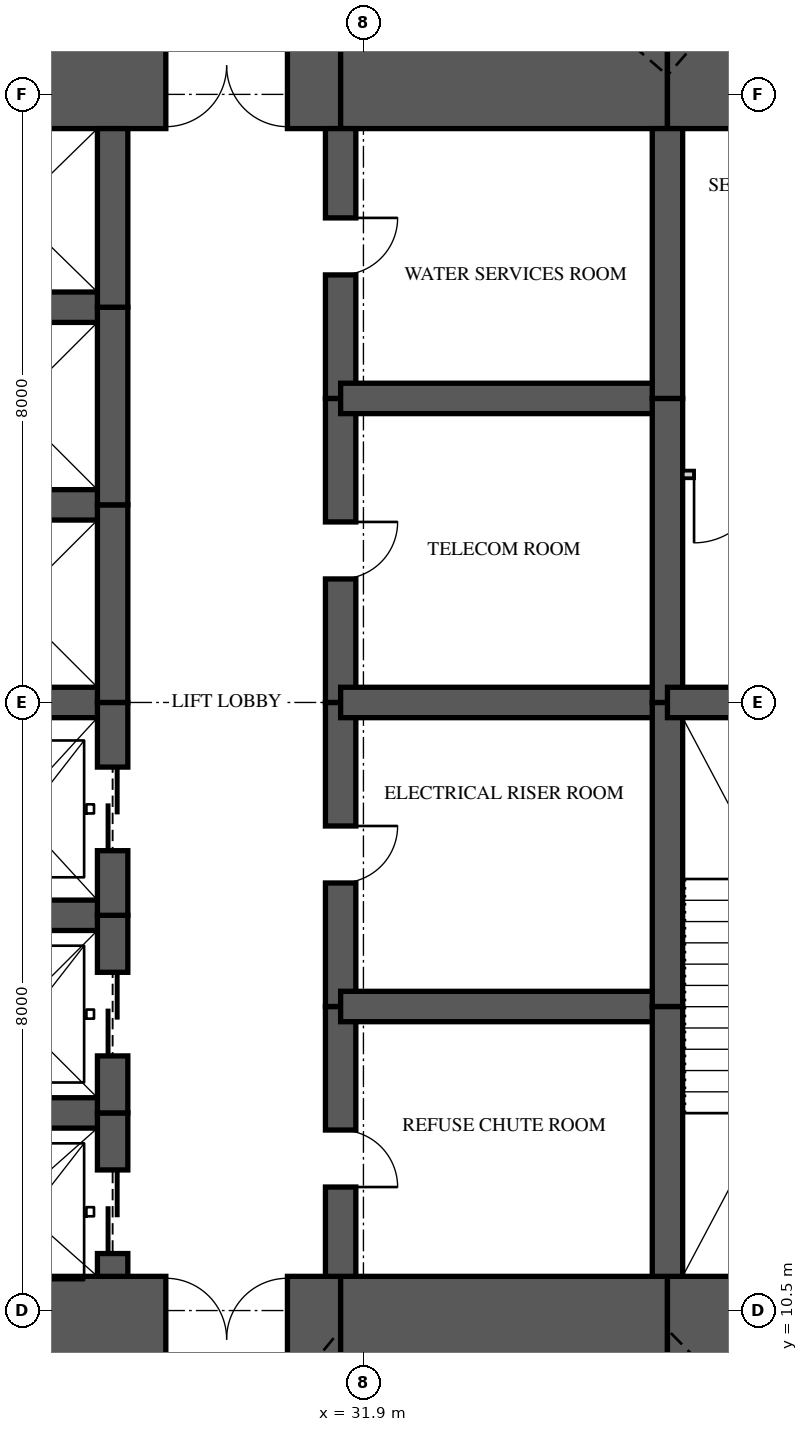
"""IFC4 building model, lengths in metres.
Left out: names, types, materials, properties, quantities, classifications, styles, units other than length and angle.
Written with IfcOpenShell. Run it as: python <this file> out.ifc"""

import sys

from ifc_helpers import new_model, si_unit, direction, frame, frame_2d, origin, place, context, subcontext, project, spatial, rectangle, extrude, element, fill, save


model = new_model("IFC4")
c1 = context("Model", 3, precision=1e-05, world=origin(), true_north=direction((0.0, 1.0)))
c2 = subcontext(c1, "Body", "Model", "MODEL_VIEW")
j1 = project(units=[si_unit("LENGTHUNIT", "METRE"), si_unit("PLANEANGLEUNIT", "RADIAN")], contexts=[c1])
p1 = place(None, origin())
s1 = spatial("IfcSite", under=j1, at=p1, CompositionType="ELEMENT")
p2 = place(p1, origin())
s2 = spatial("IfcBuilding", under=s1, at=p2, CompositionType="ELEMENT")
p3 = place(p2, frame((0.0, 0.0, 71.25)))
s3 = spatial("IfcBuildingStorey", under=s2, at=p3, CompositionType="ELEMENT", Elevation=71.25)
p4 = place(p3, frame((26.0, 10.125, 0.0), z_axis=(0.0, 0.0, 1.0), x_axis=(1.0, 0.0, 0.0)))
e1 = element("IfcWall", 1, at=p4, inside=s3, PredefinedType="SHEAR", context=c2, shape_type="SweptSolid", body=[
    extrude(rectangle(XDim=5.6, YDim=1.65, at=frame_2d((2.8, 0.0))), origin(), (0.0, 0.0, 1.0), 3.5),
])
p5 = place(p4, frame((3.3, 0.0, 0.0)))
e2 = element("IfcOpeningElement", 2, at=p5, cuts=e1, PredefinedType="OPENING", context=c2, shape_type="SweptSolid", body=[
    extrude(rectangle(XDim=1.6, YDim=2.1, at=frame_2d((0.8, 1.05))), frame((0.0, 0.835, 0.0), z_axis=(0.0, -1.0, 0.0), x_axis=(1.0, 0.0, 0.0)), (0.0, 0.0, 1.0), 1.67),
])
p6 = place(p3, frame((31.6, 10.125, 0.0), z_axis=(0.0, 0.0, 1.0), x_axis=(1.0, 0.0, 0.0)))
e3 = element("IfcWall", 3, at=p6, inside=s3, PredefinedType="SHEAR", context=c2, shape_type="SweptSolid", body=[
    extrude(rectangle(XDim=4.3, YDim=1.65, at=frame_2d((2.15, 0.0))), origin(), (0.0, 0.0, 1.0), 3.5),
])
p7 = place(p3, frame((35.9, 10.125, 0.0), z_axis=(0.0, 0.0, 1.0), x_axis=(1.0, 0.0, 0.0)))
e4 = element("IfcWall", 4, at=p7, inside=s3, PredefinedType="SHEAR", context=c2, shape_type="SweptSolid", body=[
    extrude(rectangle(XDim=8.375, YDim=1.65, at=frame_2d((4.188, 0.0))), origin(), (0.0, 0.0, 1.0), 3.5),
])
p8 = place(p7, frame((2.7, 0.0, 0.0)))
e5 = element("IfcOpeningElement", 5, at=p8, cuts=e4, PredefinedType="OPENING", context=c2, shape_type="SweptSolid", body=[
    extrude(rectangle(XDim=1.0, YDim=2.1, at=frame_2d((0.5, 1.05))), frame((0.0, 0.835, 0.0), z_axis=(0.0, -1.0, 0.0), x_axis=(1.0, 0.0, 0.0)), (0.0, 0.0, 1.0), 1.67),
])
p9 = place(p3, frame((44.275, 26.875, 0.0), z_axis=(0.0, 0.0, 1.0), x_axis=(-1.0, 0.0, 0.0)))
e6 = element("IfcWall", 6, at=p9, inside=s3, PredefinedType="SHEAR", context=c2, shape_type="SweptSolid", body=[
    extrude(rectangle(XDim=8.375, YDim=1.65, at=frame_2d((4.188, 0.0))), origin(), (0.0, 0.0, 1.0), 3.5),
])
p10 = place(p9, frame((5.775, 0.0, 0.0)))
e7 = element("IfcOpeningElement", 7, at=p10, cuts=e6, PredefinedType="OPENING", context=c2, shape_type="SweptSolid", body=[
    extrude(rectangle(XDim=0.9, YDim=2.1, at=frame_2d((0.45, 1.05))), frame((0.0, 0.835, 0.0), z_axis=(0.0, -1.0, 0.0), x_axis=(1.0, 0.0, 0.0)), (0.0, 0.0, 1.0), 1.67),
])
p11 = place(p3, frame((35.9, 26.875, 0.0), z_axis=(0.0, 0.0, 1.0), x_axis=(-1.0, 0.0, 0.0)))
e8 = element("IfcWall", 8, at=p11, inside=s3, PredefinedType="SHEAR", context=c2, shape_type="SweptSolid", body=[
    extrude(rectangle(XDim=4.3, YDim=1.65, at=frame_2d((2.15, 0.0))), origin(), (0.0, 0.0, 1.0), 3.5),
])
p12 = place(p3, frame((31.6, 26.875, 0.0), z_axis=(0.0, 0.0, 1.0), x_axis=(-1.0, 0.0, 0.0)))
e9 = element("IfcWall", 9, at=p12, inside=s3, PredefinedType="SHEAR", context=c2, shape_type="SweptSolid", body=[
    extrude(rectangle(XDim=5.6, YDim=1.65, at=frame_2d((2.8, 0.0))), origin(), (0.0, 0.0, 1.0), 3.5),
])
p13 = place(p12, frame((0.7, 0.0, 0.0)))
e10 = element("IfcOpeningElement", 10, at=p13, cuts=e9, PredefinedType="OPENING", context=c2, shape_type="SweptSolid", body=[
    extrude(rectangle(XDim=1.6, YDim=2.1, at=frame_2d((0.8, 1.05))), frame((0.0, 0.835, 0.0), z_axis=(0.0, -1.0, 0.0), x_axis=(1.0, 0.0, 0.0)), (0.0, 0.0, 1.0), 1.67),
])
p14 = place(p3, frame((28.6, 10.95, 0.0), z_axis=(0.0, 0.0, 1.0), x_axis=(0.0, 1.0, 0.0)))
e11 = element("IfcWall", 11, at=p14, inside=s3, PredefinedType="SHEAR", context=c2, shape_type="SweptSolid", body=[
    extrude(rectangle(XDim=2.15, YDim=0.4, at=frame_2d((1.075, 0.0))), origin(), (0.0, 0.0, 1.0), 3.5),
])
p15 = place(p14, frame((0.3, 0.0, 0.0)))
e12 = element("IfcOpeningElement", 12, at=p15, cuts=e11, PredefinedType="OPENING", context=c2, shape_type="SweptSolid", body=[
    extrude(rectangle(XDim=1.1, YDim=2.1, at=frame_2d((0.55, 1.05))), frame((0.0, 0.21, 0.0), z_axis=(0.0, -1.0, 0.0), x_axis=(1.0, 0.0, 0.0)), (0.0, 0.0, 1.0), 0.42),
])
p16 = place(p3, frame((28.6, 13.1, 0.0), z_axis=(0.0, 0.0, 1.0), x_axis=(0.0, 1.0, 0.0)))
e13 = element("IfcWall", 13, at=p16, inside=s3, PredefinedType="SHEAR", context=c2, shape_type="SweptSolid", body=[
    extrude(rectangle(XDim=2.6, YDim=0.4, at=frame_2d((1.3, 0.0))), origin(), (0.0, 0.0, 1.0), 3.5),
])
p17 = place(p16, frame((0.75, 0.0, 0.0)))
e14 = element("IfcOpeningElement", 14, at=p17, cuts=e13, PredefinedType="OPENING", context=c2, shape_type="SweptSolid", body=[
    extrude(rectangle(XDim=1.1, YDim=2.1, at=frame_2d((0.55, 1.05))), frame((0.0, 0.21, 0.0), z_axis=(0.0, -1.0, 0.0), x_axis=(1.0, 0.0, 0.0)), (0.0, 0.0, 1.0), 0.42),
])
p18 = place(p3, frame((28.6, 15.7, 0.0), z_axis=(0.0, 0.0, 1.0), x_axis=(0.0, 1.0, 0.0)))
e15 = element("IfcWall", 15, at=p18, inside=s3, PredefinedType="SHEAR", context=c2, shape_type="SweptSolid", body=[
    extrude(rectangle(XDim=2.8, YDim=0.4, at=frame_2d((1.4, 0.0))), origin(), (0.0, 0.0, 1.0), 3.5),
])
p19 = place(p18, frame((0.85, 0.0, 0.0)))
e16 = element("IfcOpeningElement", 16, at=p19, cuts=e15, PredefinedType="OPENING", context=c2, shape_type="SweptSolid", body=[
    extrude(rectangle(XDim=1.1, YDim=2.1, at=frame_2d((0.55, 1.05))), frame((0.0, 0.21, 0.0), z_axis=(0.0, -1.0, 0.0), x_axis=(1.0, 0.0, 0.0)), (0.0, 0.0, 1.0), 0.42),
])
p20 = place(p3, frame((28.6, 18.5, 0.0), z_axis=(0.0, 0.0, 1.0), x_axis=(0.0, 1.0, 0.0)))
e17 = element("IfcWall", 17, at=p20, inside=s3, PredefinedType="SHEAR", context=c2, shape_type="SweptSolid", body=[
    extrude(rectangle(XDim=2.6, YDim=0.4, at=frame_2d((1.3, 0.0))), origin(), (0.0, 0.0, 1.0), 3.5),
])
p21 = place(p3, frame((28.6, 21.1, 0.0), z_axis=(0.0, 0.0, 1.0), x_axis=(0.0, 1.0, 0.0)))
e18 = element("IfcWall", 18, at=p21, inside=s3, PredefinedType="SHEAR", context=c2, shape_type="SweptSolid", body=[
    extrude(rectangle(XDim=2.6, YDim=0.4, at=frame_2d((1.3, 0.0))), origin(), (0.0, 0.0, 1.0), 3.5),
])
p22 = place(p3, frame((28.6, 23.7, 0.0), z_axis=(0.0, 0.0, 1.0), x_axis=(0.0, 1.0, 0.0)))
e19 = element("IfcWall", 19, at=p22, inside=s3, PredefinedType="SHEAR", context=c2, shape_type="SweptSolid", body=[
    extrude(rectangle(XDim=2.35, YDim=0.4, at=frame_2d((1.175, 0.0))), origin(), (0.0, 0.0, 1.0), 3.5),
])
p23 = place(p3, frame((31.6, 10.95, 0.0), z_axis=(0.0, 0.0, 1.0), x_axis=(0.0, 1.0, 0.0)))
e20 = element("IfcWall", 20, at=p23, inside=s3, PredefinedType="SHEAR", context=c2, shape_type="SweptSolid", body=[
    extrude(rectangle(XDim=3.55, YDim=0.4, at=frame_2d((1.775, 0.0))), origin(), (0.0, 0.0, 1.0), 3.5),
])
p24 = place(p23, frame((1.175, 0.0, 0.0)))
e21 = element("IfcOpeningElement", 21, at=p24, cuts=e20, PredefinedType="OPENING", context=c2, shape_type="SweptSolid", body=[
    extrude(rectangle(XDim=0.75, YDim=2.1, at=frame_2d((0.375, 1.05))), frame((0.0, 0.21, 0.0), z_axis=(0.0, -1.0, 0.0), x_axis=(1.0, 0.0, 0.0)), (0.0, 0.0, 1.0), 0.42),
])
p25 = place(p3, frame((31.6, 14.5, 0.0), z_axis=(0.0, 0.0, 1.0), x_axis=(0.0, 1.0, 0.0)))
e22 = element("IfcWall", 22, at=p25, inside=s3, PredefinedType="SHEAR", context=c2, shape_type="SweptSolid", body=[
    extrude(rectangle(XDim=4.0, YDim=0.4, at=frame_2d((2.0, 0.0))), origin(), (0.0, 0.0, 1.0), 3.5),
])
p26 = place(p25, frame((1.625, 0.0, 0.0)))
e23 = element("IfcOpeningElement", 23, at=p26, cuts=e22, PredefinedType="OPENING", context=c2, shape_type="SweptSolid", body=[
    extrude(rectangle(XDim=0.75, YDim=2.1, at=frame_2d((0.375, 1.05))), frame((0.0, 0.21, 0.0), z_axis=(0.0, -1.0, 0.0), x_axis=(1.0, 0.0, 0.0)), (0.0, 0.0, 1.0), 0.42),
])
p27 = place(p3, frame((31.6, 18.5, 0.0), z_axis=(0.0, 0.0, 1.0), x_axis=(0.0, 1.0, 0.0)))
e24 = element("IfcWall", 24, at=p27, inside=s3, PredefinedType="SHEAR", context=c2, shape_type="SweptSolid", body=[
    extrude(rectangle(XDim=4.0, YDim=0.4, at=frame_2d((2.0, 0.0))), origin(), (0.0, 0.0, 1.0), 3.5),
])
p28 = place(p27, frame((1.625, 0.0, 0.0)))
e25 = element("IfcOpeningElement", 25, at=p28, cuts=e24, PredefinedType="OPENING", context=c2, shape_type="SweptSolid", body=[
    extrude(rectangle(XDim=0.75, YDim=2.1, at=frame_2d((0.375, 1.05))), frame((0.0, 0.21, 0.0), z_axis=(0.0, -1.0, 0.0), x_axis=(1.0, 0.0, 0.0)), (0.0, 0.0, 1.0), 0.42),
])
p29 = place(p3, frame((31.6, 22.5, 0.0), z_axis=(0.0, 0.0, 1.0), x_axis=(0.0, 1.0, 0.0)))
e26 = element("IfcWall", 26, at=p29, inside=s3, PredefinedType="SHEAR", context=c2, shape_type="SweptSolid", body=[
    extrude(rectangle(XDim=3.55, YDim=0.4, at=frame_2d((1.775, 0.0))), origin(), (0.0, 0.0, 1.0), 3.5),
])
p30 = place(p29, frame((1.625, 0.0, 0.0)))
e27 = element("IfcOpeningElement", 27, at=p30, cuts=e26, PredefinedType="OPENING", context=c2, shape_type="SweptSolid", body=[
    extrude(rectangle(XDim=0.75, YDim=2.1, at=frame_2d((0.375, 1.05))), frame((0.0, 0.21, 0.0), z_axis=(0.0, -1.0, 0.0), x_axis=(1.0, 0.0, 0.0)), (0.0, 0.0, 1.0), 0.42),
])
p31 = place(p3, frame((35.9, 10.95, 0.0), z_axis=(0.0, 0.0, 1.0), x_axis=(0.0, 1.0, 0.0)))
e28 = element("IfcWall", 28, at=p31, inside=s3, PredefinedType="SHEAR", context=c2, shape_type="SweptSolid", body=[
    extrude(rectangle(XDim=3.55, YDim=0.4, at=frame_2d((1.775, 0.0))), origin(), (0.0, 0.0, 1.0), 3.5),
])
for number, where, z_axis, x_axis in (
    (29, (35.9, 14.5, 0.0), (0.0, 0.0, 1.0), (0.0, 1.0, 0.0)),
    (30, (35.9, 18.5, 0.0), (0.0, 0.0, 1.0), (0.0, 1.0, 0.0)),
):
    element("IfcWall", number, at=place(p3, frame(where, z_axis=z_axis, x_axis=x_axis)), inside=s3, PredefinedType="SHEAR", context=c2, shape_type="SweptSolid", body=[
        extrude(rectangle(XDim=4.0, YDim=0.4, at=frame_2d((2.0, 0.0))), origin(), (0.0, 0.0, 1.0), 3.5),
    ])
p32 = place(p3, frame((35.9, 22.5, 0.0), z_axis=(0.0, 0.0, 1.0), x_axis=(0.0, 1.0, 0.0)))
e31 = element("IfcWall", 31, at=p32, inside=s3, PredefinedType="SHEAR", context=c2, shape_type="SweptSolid", body=[
    extrude(rectangle(XDim=3.55, YDim=0.4, at=frame_2d((1.775, 0.0))), origin(), (0.0, 0.0, 1.0), 3.5),
])
for number, where, z_axis, x_axis in (
    (32, (26.0, 13.1, 0.0), (0.0, 0.0, 1.0), (1.0, 0.0, 0.0)),
    (33, (26.0, 15.7, 0.0), (0.0, 0.0, 1.0), (1.0, 0.0, 0.0)),
    (34, (26.0, 18.5, 0.0), (0.0, 0.0, 1.0), (1.0, 0.0, 0.0)),
    (35, (26.0, 21.1, 0.0), (0.0, 0.0, 1.0), (1.0, 0.0, 0.0)),
    (36, (26.0, 23.7, 0.0), (0.0, 0.0, 1.0), (1.0, 0.0, 0.0)),
):
    element("IfcWall", number, at=place(p3, frame(where, z_axis=z_axis, x_axis=x_axis)), inside=s3, PredefinedType="SHEAR", context=c2, shape_type="SweptSolid", body=[
        extrude(rectangle(XDim=2.6, YDim=0.4, at=frame_2d((1.3, 0.0))), origin(), (0.0, 0.0, 1.0), 3.5),
    ])
for number, where, z_axis, x_axis in (
    (37, (31.6, 14.5, 0.0), (0.0, 0.0, 1.0), (1.0, 0.0, 0.0)),
    (38, (31.6, 18.5, 0.0), (0.0, 0.0, 1.0), (1.0, 0.0, 0.0)),
    (39, (31.6, 22.5, 0.0), (0.0, 0.0, 1.0), (1.0, 0.0, 0.0)),
):
    element("IfcWall", number, at=place(p3, frame(where, z_axis=z_axis, x_axis=x_axis)), inside=s3, PredefinedType="SHEAR", context=c2, shape_type="SweptSolid", body=[
        extrude(rectangle(XDim=4.3, YDim=0.4, at=frame_2d((2.15, 0.0))), origin(), (0.0, 0.0, 1.0), 3.5),
    ])
p33 = place(p3, frame((35.9, 18.5, 0.0), z_axis=(0.0, 0.0, 1.0), x_axis=(1.0, 0.0, 0.0)))
e40 = element("IfcWall", 40, at=p33, inside=s3, PredefinedType="SHEAR", context=c2, shape_type="SweptSolid", body=[
    extrude(rectangle(XDim=4.3, YDim=0.4, at=frame_2d((2.15, 0.0))), origin(), (0.0, 0.0, 1.0), 3.5),
])
p34 = place(p3, frame((36.1, 21.5, 0.0), z_axis=(0.0, 0.0, 1.0), x_axis=(1.0, 0.0, 0.0)))
e41 = element("IfcWall", 41, at=p34, inside=s3, PredefinedType="PARTITIONING", context=c2, shape_type="SweptSolid", body=[
    extrude(rectangle(XDim=3.9, YDim=0.1, at=frame_2d((1.95, 0.0))), origin(), (0.0, 0.0, 1.0), 3.22),
])
p35 = place(p34, frame((0.15, 0.0, 0.0)))
e42 = element("IfcOpeningElement", 42, at=p35, cuts=e41, PredefinedType="OPENING", context=c2, shape_type="SweptSolid", body=[
    extrude(rectangle(XDim=0.9, YDim=2.1, at=frame_2d((0.45, 1.05))), frame((0.0, 0.06, 0.0), z_axis=(0.0, -1.0, 0.0), x_axis=(1.0, 0.0, 0.0)), (0.0, 0.0, 1.0), 0.12),
])
p36 = place(p35, frame((0.9, 0.0, 0.0), z_axis=(0.0, 0.0, 1.0), x_axis=(-1.0, 0.0, 0.0)))
e43 = element("IfcDoor", 43, at=p36, inside=s3, OperationType="SINGLE_SWING_RIGHT", PredefinedType="DOOR", context=c2, shape_type="SweptSolid", body=[
    extrude(rectangle(XDim=0.9, YDim=2.1, at=frame_2d((0.45, 1.05))), frame((0.0, 0.025, 0.0), z_axis=(0.0, -1.0, 0.0), x_axis=(1.0, 0.0, 0.0)), (0.0, 0.0, 1.0), 0.05),
])
fill(e42, e43)
p37 = place(p15, origin())
e44 = element("IfcDoor", 44, at=p37, inside=s3, OperationType="SLIDING_TO_LEFT", PredefinedType="DOOR", context=c2, shape_type="SweptSolid", body=[
    extrude(rectangle(XDim=1.1, YDim=2.1, at=frame_2d((0.55, 1.05))), frame((0.0, 0.025, 0.0), z_axis=(0.0, -1.0, 0.0), x_axis=(1.0, 0.0, 0.0)), (0.0, 0.0, 1.0), 0.05),
])
fill(e12, e44)
p38 = place(p17, origin())
e45 = element("IfcDoor", 45, at=p38, inside=s3, OperationType="SLIDING_TO_LEFT", PredefinedType="DOOR", context=c2, shape_type="SweptSolid", body=[
    extrude(rectangle(XDim=1.1, YDim=2.1, at=frame_2d((0.55, 1.05))), frame((0.0, 0.025, 0.0), z_axis=(0.0, -1.0, 0.0), x_axis=(1.0, 0.0, 0.0)), (0.0, 0.0, 1.0), 0.05),
])
fill(e14, e45)
p39 = place(p19, origin())
e46 = element("IfcDoor", 46, at=p39, inside=s3, OperationType="SLIDING_TO_LEFT", PredefinedType="DOOR", context=c2, shape_type="SweptSolid", body=[
    extrude(rectangle(XDim=1.1, YDim=2.1, at=frame_2d((0.55, 1.05))), frame((0.0, 0.025, 0.0), z_axis=(0.0, -1.0, 0.0), x_axis=(1.0, 0.0, 0.0)), (0.0, 0.0, 1.0), 0.05),
])
fill(e16, e46)
p40 = place(p5, origin())
e47 = element("IfcDoor", 47, at=p40, inside=s3, OperationType="DOUBLE_DOOR_SINGLE_SWING", PredefinedType="DOOR", context=c2, shape_type="SweptSolid", body=[
    extrude(rectangle(XDim=1.6, YDim=2.1, at=frame_2d((0.8, 1.05))), frame((0.0, 0.025, 0.0), z_axis=(0.0, -1.0, 0.0), x_axis=(1.0, 0.0, 0.0)), (0.0, 0.0, 1.0), 0.05),
])
fill(e2, e47)
p41 = place(p13, origin())
e48 = element("IfcDoor", 48, at=p41, inside=s3, OperationType="DOUBLE_DOOR_SINGLE_SWING", PredefinedType="DOOR", context=c2, shape_type="SweptSolid", body=[
    extrude(rectangle(XDim=1.6, YDim=2.1, at=frame_2d((0.8, 1.05))), frame((0.0, 0.025, 0.0), z_axis=(0.0, -1.0, 0.0), x_axis=(1.0, 0.0, 0.0)), (0.0, 0.0, 1.0), 0.05),
])
fill(e10, e48)
p42 = place(p24, frame((0.75, 0.0, 0.0), z_axis=(0.0, 0.0, 1.0), x_axis=(-1.0, 0.0, 0.0)))
e49 = element("IfcDoor", 49, at=p42, inside=s3, OperationType="SINGLE_SWING_RIGHT", PredefinedType="DOOR", context=c2, shape_type="SweptSolid", body=[
    extrude(rectangle(XDim=0.75, YDim=2.1, at=frame_2d((0.375, 1.05))), frame((0.0, 0.025, 0.0), z_axis=(0.0, -1.0, 0.0), x_axis=(1.0, 0.0, 0.0)), (0.0, 0.0, 1.0), 0.05),
])
fill(e21, e49)
p43 = place(p26, frame((0.75, 0.0, 0.0), z_axis=(0.0, 0.0, 1.0), x_axis=(-1.0, 0.0, 0.0)))
e50 = element("IfcDoor", 50, at=p43, inside=s3, OperationType="SINGLE_SWING_LEFT", PredefinedType="DOOR", context=c2, shape_type="SweptSolid", body=[
    extrude(rectangle(XDim=0.75, YDim=2.1, at=frame_2d((0.375, 1.05))), frame((0.0, 0.025, 0.0), z_axis=(0.0, -1.0, 0.0), x_axis=(1.0, 0.0, 0.0)), (0.0, 0.0, 1.0), 0.05),
])
fill(e23, e50)
p44 = place(p28, frame((0.75, 0.0, 0.0), z_axis=(0.0, 0.0, 1.0), x_axis=(-1.0, 0.0, 0.0)))
e51 = element("IfcDoor", 51, at=p44, inside=s3, OperationType="SINGLE_SWING_LEFT", PredefinedType="DOOR", context=c2, shape_type="SweptSolid", body=[
    extrude(rectangle(XDim=0.75, YDim=2.1, at=frame_2d((0.375, 1.05))), frame((0.0, 0.025, 0.0), z_axis=(0.0, -1.0, 0.0), x_axis=(1.0, 0.0, 0.0)), (0.0, 0.0, 1.0), 0.05),
])
fill(e25, e51)
p45 = place(p30, frame((0.75, 0.0, 0.0), z_axis=(0.0, 0.0, 1.0), x_axis=(-1.0, 0.0, 0.0)))
e52 = element("IfcDoor", 52, at=p45, inside=s3, OperationType="SINGLE_SWING_LEFT", PredefinedType="DOOR", context=c2, shape_type="SweptSolid", body=[
    extrude(rectangle(XDim=0.75, YDim=2.1, at=frame_2d((0.375, 1.05))), frame((0.0, 0.025, 0.0), z_axis=(0.0, -1.0, 0.0), x_axis=(1.0, 0.0, 0.0)), (0.0, 0.0, 1.0), 0.05),
])
fill(e27, e52)
save(model, sys.argv[1])
